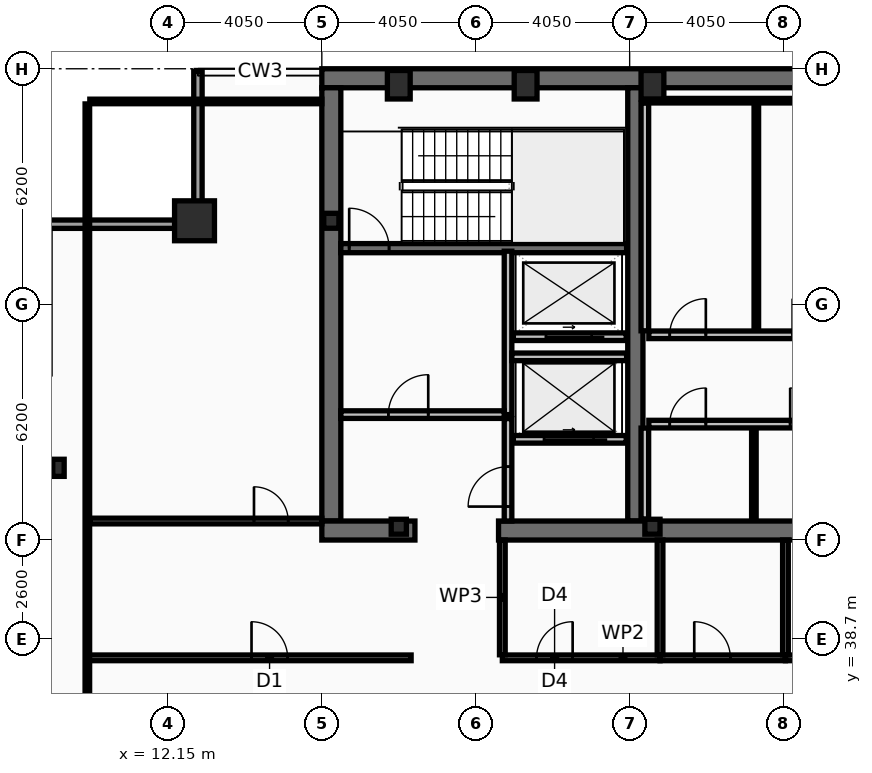
"""IFC4 building model, lengths in metres.
Left out: names, types, materials, properties, quantities, classifications, styles, units other than length and angle.
Written with IfcOpenShell. Run it as: python <this file> out.ifc"""

import sys

from ifc_helpers import new_model, si_unit, direction, frame, frame_2d, origin, origin_2d, place, context, subcontext, project, spatial, rectangle, hollow_rectangle, i_section, extrude, element, fill, save


model = new_model("IFC4")
c1 = context("Model", 3, precision=1e-05, world=origin(), true_north=direction((0.0, 1.0)))
c2 = subcontext(c1, "Body", "Model", "MODEL_VIEW")
j1 = project(units=[si_unit("LENGTHUNIT", "METRE"), si_unit("PLANEANGLEUNIT", "RADIAN")], contexts=[c1])
p1 = place(None, origin())
s1 = spatial("IfcSite", under=j1, at=p1, CompositionType="ELEMENT")
p2 = place(p1, origin())
s2 = spatial("IfcBuilding", under=s1, at=p2, CompositionType="ELEMENT")
p3 = place(p2, frame((0.0, 0.0, 273.4)))
s3 = spatial("IfcBuildingStorey", under=s2, at=p3, CompositionType="ELEMENT", Elevation=273.4)
p4 = place(p3, frame((16.2, 53.45, 0.0), z_axis=(0.0, 0.0, 1.0), x_axis=(1.0, 0.0, 0.0)))
e1 = element("IfcWall", 1, at=p4, inside=s3, PredefinedType="SHEAR", context=c2, shape_type="SweptSolid", body=[
    extrude(rectangle(XDim=40.5, YDim=0.5, at=frame_2d((20.25, 0.0))), origin(), (0.0, 0.0, 1.0), 3.44),
])
p5 = place(p3, frame((16.45, 41.8, 0.0), z_axis=(0.0, 0.0, 1.0), x_axis=(0.0, 1.0, 0.0)))
e2 = element("IfcWall", 2, at=p5, inside=s3, PredefinedType="SHEAR", context=c2, shape_type="SweptSolid", body=[
    extrude(rectangle(XDim=11.4, YDim=0.5, at=frame_2d((5.7, 0.0))), origin(), (0.0, 0.0, 1.0), 3.44),
])
p6 = place(p3, frame((24.45, 41.8, 0.0), z_axis=(0.0, 0.0, 1.0), x_axis=(0.0, 1.0, 0.0)))
e3 = element("IfcWall", 3, at=p6, inside=s3, PredefinedType="SHEAR", context=c2, shape_type="SweptSolid", body=[
    extrude(rectangle(XDim=11.4, YDim=0.4, at=frame_2d((5.7, 0.0))), origin(), (0.0, 0.0, 1.0), 3.44),
])
p7 = place(p3, frame((18.65, 41.55, 0.0), z_axis=(0.0, 0.0, 1.0), x_axis=(-1.0, 0.0, 0.0)))
e4 = element("IfcWall", 4, at=p7, inside=s3, PredefinedType="SHEAR", context=c2, shape_type="SweptSolid", body=[
    extrude(rectangle(XDim=2.45, YDim=0.5, at=frame_2d((1.225, 0.0))), origin(), (0.0, 0.0, 1.0), 3.44),
])
p8 = place(p3, frame((32.3, 41.55, 0.0), z_axis=(0.0, 0.0, 1.0), x_axis=(-1.0, 0.0, 0.0)))
e5 = element("IfcWall", 5, at=p8, inside=s3, PredefinedType="SHEAR", context=c2, shape_type="SweptSolid", body=[
    extrude(rectangle(XDim=11.45, YDim=0.5, at=frame_2d((5.725, 0.0))), origin(), (0.0, 0.0, 1.0), 3.44),
])
p9 = place(p3, frame((16.7, 48.98, 0.0), z_axis=(0.0, 0.0, 1.0), x_axis=(1.0, 0.0, 0.0)))
e6 = element("IfcWall", 6, at=p9, inside=s3, PredefinedType="SHEAR", context=c2, shape_type="SweptSolid", body=[
    extrude(rectangle(XDim=7.52, YDim=0.24, at=frame_2d((3.76, 0.0))), origin(), (0.0, 0.0, 1.0), 3.44),
])
p10 = place(p9, frame((0.22, 0.0, 0.0)))
e7 = element("IfcOpeningElement", 7, at=p10, cuts=e6, PredefinedType="OPENING", context=c2, shape_type="SweptSolid", body=[
    extrude(rectangle(XDim=1.05, YDim=2.15, at=frame_2d((0.525, 1.075))), frame((0.0, 0.13, 0.0), z_axis=(0.0, -1.0, 0.0), x_axis=(1.0, 0.0, 0.0)), (0.0, 0.0, 1.0), 0.26),
])
p11 = place(p3, frame((12.85, 49.7, 0.0), z_axis=(0.0, 0.0, 1.0), x_axis=(1.0, 0.0, 0.0)))
e8 = element("IfcColumn", 8, at=p11, inside=s3, PredefinedType="COLUMN", context=c2, shape_type="SweptSolid", body=[
    extrude(hollow_rectangle(XDim=1.05, YDim=1.05, WallThickness=0.055, at=origin_2d()), origin(), (0.0, 0.0, 1.0), 3.6),
])
for number, where, z_axis, x_axis in (
    (9, (18.225, 53.28, 0.0), (0.0, 0.0, 1.0), (1.0, 0.0, 0.0)),
    (10, (21.562, 53.28, 0.0), (0.0, 0.0, 1.0), (1.0, 0.0, 0.0)),
    (11, (24.9, 53.28, 0.0), (0.0, 0.0, 1.0), (1.0, 0.0, 0.0)),
):
    element("IfcColumn", number, at=place(p3, frame(where, z_axis=z_axis, x_axis=x_axis)), inside=s3, PredefinedType="COLUMN", context=c2, shape_type="SweptSolid", body=[
        extrude(hollow_rectangle(XDim=0.6, YDim=0.75, WallThickness=0.045, at=origin_2d()), origin(), (0.0, 0.0, 1.0), 3.6),
    ])
p12 = place(p3, frame((9.27, 43.2, 0.0), z_axis=(0.0, 0.0, 1.0), x_axis=(1.0, 0.0, 0.0)))
e12 = element("IfcColumn", 12, at=p12, inside=s3, PredefinedType="COLUMN", context=c2, shape_type="SweptSolid", body=[
    extrude(i_section(OverallWidth=0.3, OverallDepth=0.45, WebThickness=0.014, FlangeThickness=0.026, at=origin_2d()), origin(), (0.0, 0.0, 1.0), 3.6),
])
for number, where, z_axis, x_axis in (
    (13, (16.45, 49.7, 0.0), (0.0, 0.0, 1.0), (1.0, 0.0, 0.0)),
    (14, (18.225, 41.65, 0.0), (0.0, 0.0, 1.0), (1.0, 0.0, 0.0)),
    (15, (24.9, 41.65, 0.0), (0.0, 0.0, 1.0), (1.0, 0.0, 0.0)),
):
    element("IfcColumn", number, at=place(p3, frame(where, z_axis=z_axis, x_axis=x_axis)), inside=s3, PredefinedType="COLUMN", context=c2, shape_type="SweptSolid", body=[
        extrude(i_section(OverallWidth=0.399, OverallDepth=0.393, WebThickness=0.023, FlangeThickness=0.037, at=origin_2d()), origin(), (0.0, 0.0, 1.0), 3.6),
    ])
p13 = place(p3, frame((8.83, 49.61, 0.0), z_axis=(0.0, 0.0, 1.0), x_axis=(1.0, 0.0, 0.0)))
e16 = element("IfcWall", 16, at=p13, inside=s3, PredefinedType="SOLIDWALL", context=c2, shape_type="SweptSolid", body=[
    extrude(rectangle(XDim=4.22, YDim=0.22, at=frame_2d((2.11, 0.0))), origin(), (0.0, 0.0, 1.0), 2.88),
])
p14 = place(p3, frame((12.94, 49.72, 0.0), z_axis=(0.0, 0.0, 1.0), x_axis=(0.0, 1.0, 0.0)))
e17 = element("IfcWall", 17, at=p14, inside=s3, PredefinedType="SOLIDWALL", context=c2, shape_type="SweptSolid", body=[
    extrude(rectangle(XDim=3.91, YDim=0.22, at=frame_2d((1.955, 0.0))), origin(), (0.0, 0.0, 1.0), 2.88),
])
p15 = place(p3, frame((24.21, 43.95, 0.0), z_axis=(0.0, 0.0, 1.0), x_axis=(-1.0, 0.0, 0.0)))
e18 = element("IfcWall", 18, at=p15, inside=s3, PredefinedType="PARTITIONING", context=c2, shape_type="SweptSolid", body=[
    extrude(rectangle(XDim=2.97, YDim=0.2, at=frame_2d((1.485, 0.0))), origin(), (0.0, 0.0, 1.0), 3.44),
])
p16 = place(p15, frame((0.86, 0.0, 0.0)))
e19 = element("IfcOpeningElement", 19, at=p16, cuts=e18, PredefinedType="OPENING", context=c2, shape_type="SweptSolid", body=[
    extrude(rectangle(XDim=1.3, YDim=2.18, at=frame_2d((0.65, 1.09))), frame((0.0, 0.11, 0.0), z_axis=(0.0, -1.0, 0.0), x_axis=(1.0, 0.0, 0.0)), (0.0, 0.0, 1.0), 0.22),
])
p17 = place(p3, frame((24.21, 46.65, 0.0), z_axis=(0.0, 0.0, 1.0), x_axis=(-1.0, 0.0, 0.0)))
e20 = element("IfcWall", 20, at=p17, inside=s3, PredefinedType="PARTITIONING", context=c2, shape_type="SweptSolid", body=[
    extrude(rectangle(XDim=2.97, YDim=0.2, at=frame_2d((1.485, 0.0))), origin(), (0.0, 0.0, 1.0), 3.44),
])
p18 = place(p17, frame((0.91, 0.0, 0.0)))
e21 = element("IfcOpeningElement", 21, at=p18, cuts=e20, PredefinedType="OPENING", context=c2, shape_type="SweptSolid", body=[
    extrude(rectangle(XDim=1.2, YDim=2.18, at=frame_2d((0.6, 1.09))), frame((0.0, 0.11, 0.0), z_axis=(0.0, -1.0, 0.0), x_axis=(1.0, 0.0, 0.0)), (0.0, 0.0, 1.0), 0.22),
])
p19 = place(p3, frame((21.1, 44.6, 0.0), z_axis=(0.0, 0.0, 1.0), x_axis=(0.0, 1.0, 0.0)))
e22 = element("IfcWall", 22, at=p19, inside=s3, PredefinedType="PARTITIONING", context=c2, shape_type="SweptSolid", body=[
    extrude(rectangle(XDim=4.3, YDim=0.2, at=frame_2d((2.15, 0.0))), origin(), (0.0, 0.0, 1.0), 3.44),
])
p20 = place(p3, frame((16.7, 44.6, 0.0), z_axis=(0.0, 0.0, 1.0), x_axis=(1.0, 0.0, 0.0)))
e23 = element("IfcWall", 23, at=p20, inside=s3, PredefinedType="PARTITIONING", context=c2, shape_type="SweptSolid", body=[
    extrude(rectangle(XDim=4.3, YDim=0.2, at=frame_2d((2.15, 0.0))), origin(), (0.0, 0.0, 1.0), 3.44),
])
p21 = place(p20, frame((1.25, 0.0, 0.0)))
e24 = element("IfcOpeningElement", 24, at=p21, cuts=e23, PredefinedType="OPENING", context=c2, shape_type="SweptSolid", body=[
    extrude(rectangle(XDim=1.05, YDim=2.15, at=frame_2d((0.525, 1.075))), frame((0.0, 0.11, 0.0), z_axis=(0.0, -1.0, 0.0), x_axis=(1.0, 0.0, 0.0)), (0.0, 0.0, 1.0), 0.22),
])
p22 = place(p3, frame((21.2, 46.12, 0.0), z_axis=(0.0, 0.0, 1.0), x_axis=(1.0, 0.0, 0.0)))
e25 = element("IfcWall", 25, at=p22, inside=s3, PredefinedType="PARTITIONING", context=c2, shape_type="SweptSolid", body=[
    extrude(rectangle(XDim=3.02, YDim=0.2, at=frame_2d((1.51, 0.0))), origin(), (0.0, 0.0, 1.0), 3.44),
])
p23 = place(p3, frame((21.1, 41.8, 0.0), z_axis=(0.0, 0.0, 1.0), x_axis=(0.0, 1.0, 0.0)))
e26 = element("IfcWall", 26, at=p23, inside=s3, PredefinedType="PARTITIONING", context=c2, shape_type="SweptSolid", body=[
    extrude(rectangle(XDim=2.695, YDim=0.2, at=frame_2d((1.348, 0.0))), origin(), (0.0, 0.0, 1.0), 3.44),
])
p24 = place(p23, frame((0.38, 0.0, 0.0)))
e27 = element("IfcOpeningElement", 27, at=p24, cuts=e26, PredefinedType="OPENING", context=c2, shape_type="SweptSolid", body=[
    extrude(rectangle(XDim=1.05, YDim=2.15, at=frame_2d((0.525, 1.075))), frame((0.0, 0.11, 0.0), z_axis=(0.0, -1.0, 0.0), x_axis=(1.0, 0.0, 0.0)), (0.0, 0.0, 1.0), 0.22),
])
p25 = place(p3, frame((24.7, 46.805, 0.0), z_axis=(0.0, 0.0, 1.0), x_axis=(0.0, 1.0, 0.0)))
e28 = element("IfcWall", 28, at=p25, inside=s3, PredefinedType="PARTITIONING", context=c2, shape_type="SweptSolid", body=[
    extrude(rectangle(XDim=5.99, YDim=0.2, at=frame_2d((2.995, 0.0))), origin(), (0.0, 0.0, 1.0), 3.44),
])
p26 = place(p3, frame((24.805, 52.86, 0.0), z_axis=(0.0, 0.0, 1.0), x_axis=(1.0, 0.0, 0.0)))
e29 = element("IfcWall", 29, at=p26, inside=s3, PredefinedType="PARTITIONING", context=c2, shape_type="SweptSolid", body=[
    extrude(rectangle(XDim=7.51, YDim=0.12, at=frame_2d((3.755, 0.0))), origin(), (0.0, 0.0, 1.0), 3.44),
])
p27 = place(p3, frame((27.634, 46.805, 0.0), z_axis=(0.0, 0.0, 1.0), x_axis=(0.0, 1.0, 0.0)))
e30 = element("IfcWall", 30, at=p27, inside=s3, PredefinedType="PARTITIONING", context=c2, shape_type="SweptSolid", body=[
    extrude(rectangle(XDim=5.99, YDim=0.12, at=frame_2d((2.995, 0.0))), origin(), (0.0, 0.0, 1.0), 3.44),
])
p28 = place(p3, frame((24.805, 46.7, 0.0), z_axis=(0.0, 0.0, 1.0), x_axis=(1.0, 0.0, 0.0)))
e31 = element("IfcWall", 31, at=p28, inside=s3, PredefinedType="PARTITIONING", context=c2, shape_type="SweptSolid", body=[
    extrude(rectangle(XDim=7.51, YDim=0.2, at=frame_2d((3.755, 0.0))), origin(), (0.0, 0.0, 1.0), 3.44),
])
p29 = place(p28, frame((0.55, 0.0, 0.0)))
e32 = element("IfcOpeningElement", 32, at=p29, cuts=e31, PredefinedType="OPENING", context=c2, shape_type="SweptSolid", body=[
    extrude(rectangle(XDim=0.95, YDim=2.1, at=frame_2d((0.475, 1.05))), frame((0.0, 0.11, 0.0), z_axis=(0.0, -1.0, 0.0), x_axis=(1.0, 0.0, 0.0)), (0.0, 0.0, 1.0), 0.22),
])
p30 = place(p28, frame((3.784, 0.0, 0.0)))
e33 = element("IfcOpeningElement", 33, at=p30, cuts=e31, PredefinedType="OPENING", context=c2, shape_type="SweptSolid", body=[
    extrude(rectangle(XDim=0.95, YDim=2.1, at=frame_2d((0.475, 1.05))), frame((0.0, 0.11, 0.0), z_axis=(0.0, -1.0, 0.0), x_axis=(1.0, 0.0, 0.0)), (0.0, 0.0, 1.0), 0.22),
])
p31 = place(p3, frame((24.7, 41.85, 0.0), z_axis=(0.0, 0.0, 1.0), x_axis=(0.0, 1.0, 0.0)))
e34 = element("IfcWall", 34, at=p31, inside=s3, PredefinedType="PARTITIONING", context=c2, shape_type="SweptSolid", body=[
    extrude(rectangle(XDim=2.395, YDim=0.2, at=frame_2d((1.198, 0.0))), origin(), (0.0, 0.0, 1.0), 3.44),
])
p32 = place(p3, frame((27.569, 41.85, 0.0), z_axis=(0.0, 0.0, 1.0), x_axis=(0.0, 1.0, 0.0)))
e35 = element("IfcWall", 35, at=p32, inside=s3, PredefinedType="PARTITIONING", context=c2, shape_type="SweptSolid", body=[
    extrude(rectangle(XDim=2.395, YDim=0.12, at=frame_2d((1.198, 0.0))), origin(), (0.0, 0.0, 1.0), 3.44),
])
p33 = place(p3, frame((24.805, 44.35, 0.0), z_axis=(0.0, 0.0, 1.0), x_axis=(1.0, 0.0, 0.0)))
e36 = element("IfcWall", 36, at=p33, inside=s3, PredefinedType="PARTITIONING", context=c2, shape_type="SweptSolid", body=[
    extrude(rectangle(XDim=7.34, YDim=0.2, at=frame_2d((3.67, 0.0))), origin(), (0.0, 0.0, 1.0), 3.44),
])
p34 = place(p33, frame((0.55, 0.0, 0.0)))
e37 = element("IfcOpeningElement", 37, at=p34, cuts=e36, PredefinedType="OPENING", context=c2, shape_type="SweptSolid", body=[
    extrude(rectangle(XDim=0.95, YDim=2.1, at=frame_2d((0.475, 1.05))), frame((0.0, 0.11, 0.0), z_axis=(0.0, -1.0, 0.0), x_axis=(1.0, 0.0, 0.0)), (0.0, 0.0, 1.0), 0.22),
])
p35 = place(p33, frame((3.719, 0.0, 0.0)))
e38 = element("IfcOpeningElement", 38, at=p35, cuts=e36, PredefinedType="OPENING", context=c2, shape_type="SweptSolid", body=[
    extrude(rectangle(XDim=0.95, YDim=2.1, at=frame_2d((0.475, 1.05))), frame((0.0, 0.11, 0.0), z_axis=(0.0, -1.0, 0.0), x_axis=(1.0, 0.0, 0.0)), (0.0, 0.0, 1.0), 0.22),
])
p36 = place(p3, frame((20.95, 38.2, 0.0), z_axis=(0.0, 0.0, 1.0), x_axis=(1.0, 0.0, 0.0)))
e39 = element("IfcWall", 39, at=p36, inside=s3, PredefinedType="PARTITIONING", context=c2, shape_type="SweptSolid", body=[
    extrude(rectangle(XDim=4.15, YDim=0.15, at=frame_2d((2.075, 0.0))), origin(), (0.0, 0.0, 1.0), 2.78),
])
p37 = place(p36, frame((0.9, 0.0, 0.0)))
e40 = element("IfcOpeningElement", 40, at=p37, cuts=e39, PredefinedType="OPENING", context=c2, shape_type="SweptSolid", body=[
    extrude(rectangle(XDim=0.95, YDim=2.05, at=frame_2d((0.475, 1.025))), frame((0.0, 0.085, 0.0), z_axis=(0.0, -1.0, 0.0), x_axis=(1.0, 0.0, 0.0)), (0.0, 0.0, 1.0), 0.17),
])
p38 = place(p3, frame((25.1, 38.2, 0.0), z_axis=(0.0, 0.0, 1.0), x_axis=(1.0, 0.0, 0.0)))
e41 = element("IfcWall", 41, at=p38, inside=s3, PredefinedType="PARTITIONING", context=c2, shape_type="SweptSolid", body=[
    extrude(rectangle(XDim=3.3, YDim=0.15, at=frame_2d((1.65, 0.0))), origin(), (0.0, 0.0, 1.0), 2.78),
])
p39 = place(p38, frame((0.9, 0.0, 0.0)))
e42 = element("IfcOpeningElement", 42, at=p39, cuts=e41, PredefinedType="OPENING", context=c2, shape_type="SweptSolid", body=[
    extrude(rectangle(XDim=0.95, YDim=2.05, at=frame_2d((0.475, 1.025))), frame((0.0, 0.085, 0.0), z_axis=(0.0, -1.0, 0.0), x_axis=(1.0, 0.0, 0.0)), (0.0, 0.0, 1.0), 0.17),
])
p40 = place(p3, frame((28.4, 38.2, 0.0), z_axis=(0.0, 0.0, 1.0), x_axis=(1.0, 0.0, 0.0)))
e43 = element("IfcWall", 43, at=p40, inside=s3, PredefinedType="PARTITIONING", context=c2, shape_type="SweptSolid", body=[
    extrude(rectangle(XDim=3.78, YDim=0.15, at=frame_2d((1.89, 0.0))), origin(), (0.0, 0.0, 1.0), 2.78),
])
p41 = place(p40, frame((0.7, 0.0, 0.0)))
e44 = element("IfcOpeningElement", 44, at=p41, cuts=e43, PredefinedType="OPENING", context=c2, shape_type="SweptSolid", body=[
    extrude(rectangle(XDim=0.95, YDim=2.05, at=frame_2d((0.475, 1.025))), frame((0.0, 0.085, 0.0), z_axis=(0.0, -1.0, 0.0), x_axis=(1.0, 0.0, 0.0)), (0.0, 0.0, 1.0), 0.17),
])
p42 = place(p3, frame((20.95, 38.28, 0.0), z_axis=(0.0, 0.0, 1.0), x_axis=(0.0, 1.0, 0.0)))
e45 = element("IfcWall", 45, at=p42, inside=s3, PredefinedType="PARTITIONING", context=c2, shape_type="SweptSolid", body=[
    extrude(rectangle(XDim=3.02, YDim=0.15, at=frame_2d((1.51, 0.0))), origin(), (0.0, 0.0, 1.0), 3.44),
])
p43 = place(p3, frame((25.1, 38.28, 0.0), z_axis=(0.0, 0.0, 1.0), x_axis=(0.0, 1.0, 0.0)))
e46 = element("IfcWall", 46, at=p43, inside=s3, PredefinedType="PARTITIONING", context=c2, shape_type="SweptSolid", body=[
    extrude(rectangle(XDim=3.02, YDim=0.15, at=frame_2d((1.51, 0.0))), origin(), (0.0, 0.0, 1.0), 2.78),
])
p44 = place(p3, frame((28.4, 38.28, 0.0), z_axis=(0.0, 0.0, 1.0), x_axis=(0.0, 1.0, 0.0)))
e47 = element("IfcWall", 47, at=p44, inside=s3, PredefinedType="PARTITIONING", context=c2, shape_type="SweptSolid", body=[
    extrude(rectangle(XDim=3.02, YDim=0.15, at=frame_2d((1.51, 0.0))), origin(), (0.0, 0.0, 1.0), 3.44),
])
p45 = place(p3, frame((10.03, 38.2, 0.0), z_axis=(0.0, 0.0, 1.0), x_axis=(1.0, 0.0, 0.0)))
e48 = element("IfcWall", 48, at=p45, inside=s3, PredefinedType="PARTITIONING", context=c2, shape_type="SweptSolid", body=[
    extrude(rectangle(XDim=8.52, YDim=0.15, at=frame_2d((4.26, 0.0))), origin(), (0.0, 0.0, 1.0), 2.78),
])
p46 = place(p45, frame((4.32, 0.0, 0.0)))
e49 = element("IfcOpeningElement", 49, at=p46, cuts=e48, PredefinedType="OPENING", context=c2, shape_type="SweptSolid", body=[
    extrude(rectangle(XDim=0.95, YDim=2.05, at=frame_2d((0.475, 1.025))), frame((0.0, 0.085, 0.0), z_axis=(0.0, -1.0, 0.0), x_axis=(1.0, 0.0, 0.0)), (0.0, 0.0, 1.0), 0.17),
])
p47 = place(p3, frame((10.095, 41.8, 0.0), z_axis=(0.0, 0.0, 1.0), x_axis=(1.0, 0.0, 0.0)))
e50 = element("IfcWall", 50, at=p47, inside=s3, PredefinedType="PARTITIONING", context=c2, shape_type="SweptSolid", body=[
    extrude(rectangle(XDim=6.105, YDim=0.15, at=frame_2d((3.052, 0.0))), origin(), (0.0, 0.0, 1.0), 3.44),
])
p48 = place(p47, frame((4.32, 0.0, 0.0)))
e51 = element("IfcOpeningElement", 51, at=p48, cuts=e50, PredefinedType="OPENING", context=c2, shape_type="SweptSolid", body=[
    extrude(rectangle(XDim=0.9, YDim=2.05, at=frame_2d((0.45, 1.025))), frame((0.0, 0.085, 0.0), z_axis=(0.0, -1.0, 0.0), x_axis=(1.0, 0.0, 0.0)), (0.0, 0.0, 1.0), 0.17),
])
p49 = place(p3, frame((10.03, 10.665, 0.0), z_axis=(0.0, 0.0, 1.0), x_axis=(0.0, 1.0, 0.0)))
e52 = element("IfcWall", 52, at=p49, inside=s3, PredefinedType="PARTITIONING", context=c2, shape_type="SweptSolid", body=[
    extrude(rectangle(XDim=42.11, YDim=0.12, at=frame_2d((21.055, 0.0))), origin(), (0.0, 0.0, 1.0), 2.78),
])
p50 = place(p3, frame((10.095, 52.84, 0.0), z_axis=(0.0, 0.0, 1.0), x_axis=(1.0, 0.0, 0.0)))
e53 = element("IfcWall", 53, at=p50, inside=s3, PredefinedType="PARTITIONING", context=c2, shape_type="SweptSolid", body=[
    extrude(rectangle(XDim=6.105, YDim=0.12, at=frame_2d((3.052, 0.0))), origin(), (0.0, 0.0, 1.0), 3.44),
])
p51 = place(p10, origin())
e54 = element("IfcDoor", 54, at=p51, inside=s3, OperationType="SINGLE_SWING_LEFT", PredefinedType="DOOR", context=c2, shape_type="SweptSolid", body=[
    extrude(rectangle(XDim=1.05, YDim=2.15, at=frame_2d((0.525, 1.075))), frame((0.0, 0.025, 0.0), z_axis=(0.0, -1.0, 0.0), x_axis=(1.0, 0.0, 0.0)), (0.0, 0.0, 1.0), 0.05),
])
fill(e7, e54)
p52 = place(p16, origin())
e55 = element("IfcDoor", 55, at=p52, inside=s3, OperationType="SLIDING_TO_LEFT", PredefinedType="DOOR", context=c2, shape_type="SweptSolid", body=[
    extrude(rectangle(XDim=1.3, YDim=2.18, at=frame_2d((0.65, 1.09))), frame((0.0, 0.025, 0.0), z_axis=(0.0, -1.0, 0.0), x_axis=(1.0, 0.0, 0.0)), (0.0, 0.0, 1.0), 0.05),
])
fill(e19, e55)
p53 = place(p18, origin())
e56 = element("IfcDoor", 56, at=p53, inside=s3, OperationType="SLIDING_TO_LEFT", PredefinedType="DOOR", context=c2, shape_type="SweptSolid", body=[
    extrude(rectangle(XDim=1.2, YDim=2.18, at=frame_2d((0.6, 1.09))), frame((0.0, 0.025, 0.0), z_axis=(0.0, -1.0, 0.0), x_axis=(1.0, 0.0, 0.0)), (0.0, 0.0, 1.0), 0.05),
])
fill(e21, e56)
p54 = place(p21, origin())
e57 = element("IfcDoor", 57, at=p54, inside=s3, OperationType="SINGLE_SWING_RIGHT", PredefinedType="DOOR", context=c2, shape_type="SweptSolid", body=[
    extrude(rectangle(XDim=1.05, YDim=2.15, at=frame_2d((0.525, 1.075))), frame((0.0, 0.025, 0.0), z_axis=(0.0, -1.0, 0.0), x_axis=(1.0, 0.0, 0.0)), (0.0, 0.0, 1.0), 0.05),
])
fill(e24, e57)
p55 = place(p24, origin())
e58 = element("IfcDoor", 58, at=p55, inside=s3, OperationType="SINGLE_SWING_LEFT", PredefinedType="DOOR", context=c2, shape_type="SweptSolid", body=[
    extrude(rectangle(XDim=1.05, YDim=2.15, at=frame_2d((0.525, 1.075))), frame((0.0, 0.025, 0.0), z_axis=(0.0, -1.0, 0.0), x_axis=(1.0, 0.0, 0.0)), (0.0, 0.0, 1.0), 0.05),
])
fill(e27, e58)
p56 = place(p29, origin())
e59 = element("IfcDoor", 59, at=p56, inside=s3, OperationType="SINGLE_SWING_RIGHT", PredefinedType="DOOR", context=c2, shape_type="SweptSolid", body=[
    extrude(rectangle(XDim=0.95, YDim=2.1, at=frame_2d((0.475, 1.05))), frame((0.0, 0.025, 0.0), z_axis=(0.0, -1.0, 0.0), x_axis=(1.0, 0.0, 0.0)), (0.0, 0.0, 1.0), 0.05),
])
fill(e32, e59)
p57 = place(p34, origin())
e60 = element("IfcDoor", 60, at=p57, inside=s3, OperationType="SINGLE_SWING_RIGHT", PredefinedType="DOOR", context=c2, shape_type="SweptSolid", body=[
    extrude(rectangle(XDim=0.95, YDim=2.1, at=frame_2d((0.475, 1.05))), frame((0.0, 0.025, 0.0), z_axis=(0.0, -1.0, 0.0), x_axis=(1.0, 0.0, 0.0)), (0.0, 0.0, 1.0), 0.05),
])
fill(e37, e60)
p58 = place(p35, origin())
e61 = element("IfcDoor", 61, at=p58, inside=s3, OperationType="SINGLE_SWING_LEFT", PredefinedType="DOOR", context=c2, shape_type="SweptSolid", body=[
    extrude(rectangle(XDim=0.95, YDim=2.1, at=frame_2d((0.475, 1.05))), frame((0.0, 0.025, 0.0), z_axis=(0.0, -1.0, 0.0), x_axis=(1.0, 0.0, 0.0)), (0.0, 0.0, 1.0), 0.05),
])
fill(e38, e61)
p59 = place(p37, origin())
e62 = element("IfcDoor", 62, at=p59, inside=s3, OperationType="SINGLE_SWING_RIGHT", PredefinedType="DOOR", context=c2, shape_type="SweptSolid", body=[
    extrude(rectangle(XDim=0.95, YDim=2.05, at=frame_2d((0.475, 1.025))), frame((0.0, 0.025, 0.0), z_axis=(0.0, -1.0, 0.0), x_axis=(1.0, 0.0, 0.0)), (0.0, 0.0, 1.0), 0.05),
])
fill(e40, e62)
p60 = place(p39, origin())
e63 = element("IfcDoor", 63, at=p60, inside=s3, OperationType="SINGLE_SWING_LEFT", PredefinedType="DOOR", context=c2, shape_type="SweptSolid", body=[
    extrude(rectangle(XDim=0.95, YDim=2.05, at=frame_2d((0.475, 1.025))), frame((0.0, 0.025, 0.0), z_axis=(0.0, -1.0, 0.0), x_axis=(1.0, 0.0, 0.0)), (0.0, 0.0, 1.0), 0.05),
])
fill(e42, e63)
p61 = place(p46, origin())
e64 = element("IfcDoor", 64, at=p61, inside=s3, OperationType="SINGLE_SWING_LEFT", PredefinedType="DOOR", context=c2, shape_type="SweptSolid", body=[
    extrude(rectangle(XDim=0.95, YDim=2.05, at=frame_2d((0.475, 1.025))), frame((0.0, 0.025, 0.0), z_axis=(0.0, -1.0, 0.0), x_axis=(1.0, 0.0, 0.0)), (0.0, 0.0, 1.0), 0.05),
])
fill(e49, e64)
p62 = place(p48, origin())
e65 = element("IfcDoor", 65, at=p62, inside=s3, OperationType="SINGLE_SWING_LEFT", PredefinedType="DOOR", context=c2, shape_type="SweptSolid", body=[
    extrude(rectangle(XDim=0.9, YDim=2.05, at=frame_2d((0.45, 1.025))), frame((0.0, 0.025, 0.0), z_axis=(0.0, -1.0, 0.0), x_axis=(1.0, 0.0, 0.0)), (0.0, 0.0, 1.0), 0.05),
])
fill(e51, e65)
save(model, sys.argv[1])
